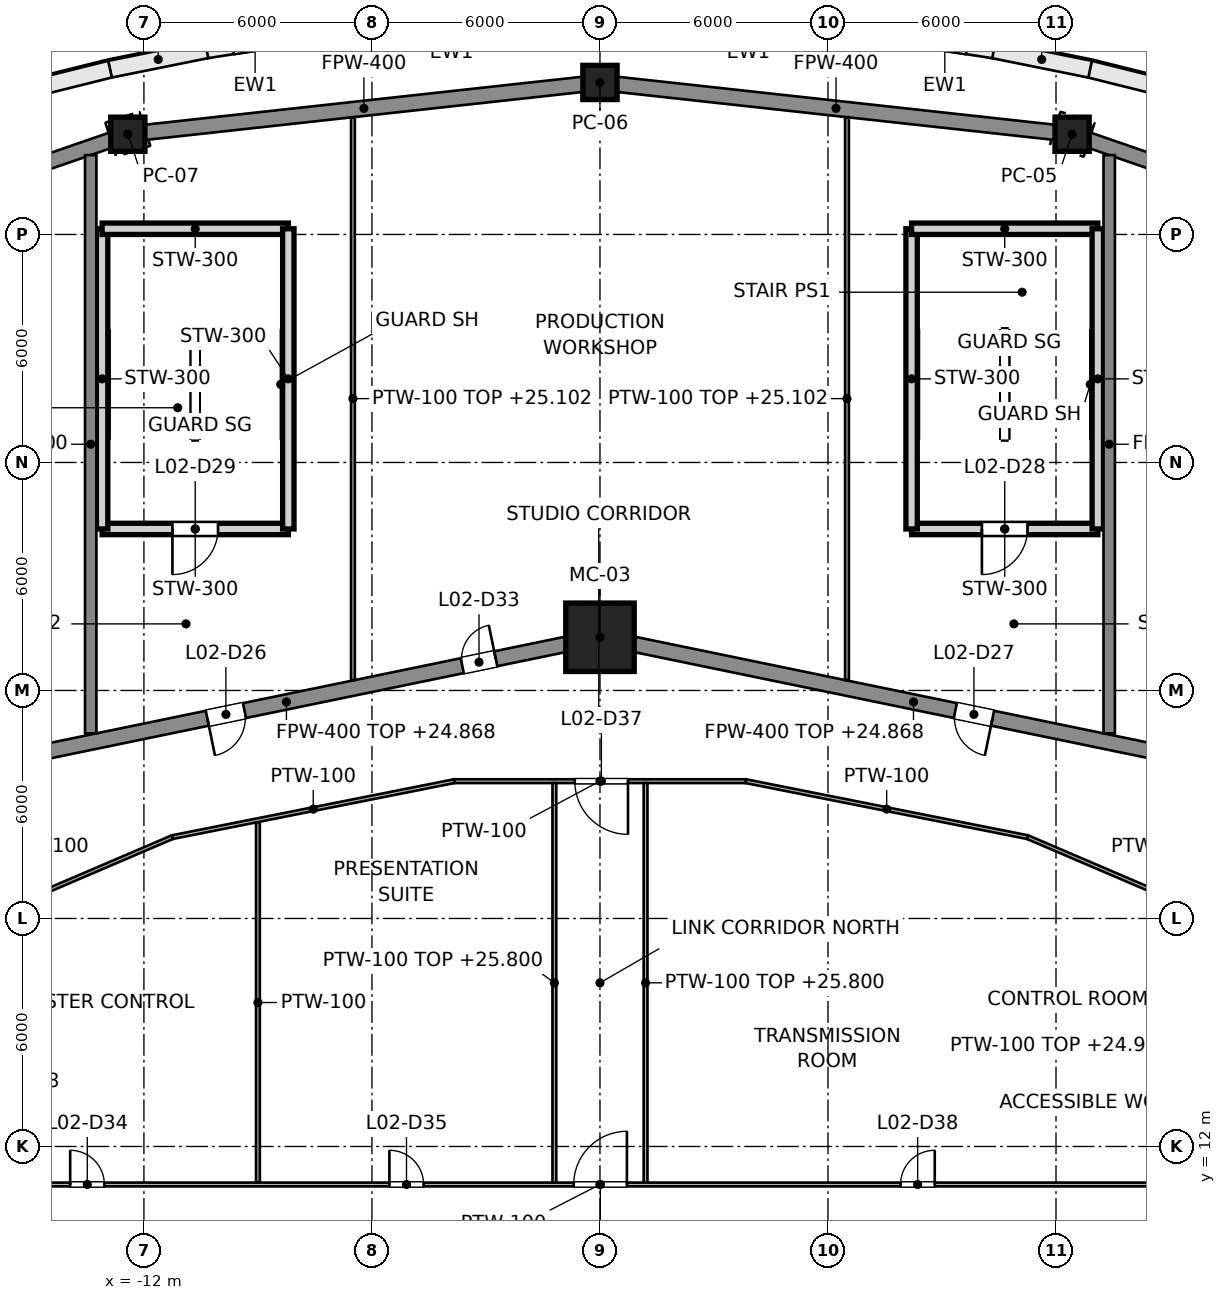
"""IFC4 building model, lengths in metres.
Left out: names, types, materials, properties, quantities, classifications, styles, units other than length and angle.
Written with IfcOpenShell. Run it as: python <this file> out.ifc"""

import sys

from ifc_helpers import new_model, si_unit, direction, frame, frame_2d, origin, origin_2d, place, context, subcontext, project, spatial, polyline, rectangle, hollow_rectangle, outline, extrude, element, fill, save


model = new_model("IFC4")
c1 = context("Model", 3, precision=1e-05, world=origin(), true_north=direction((0.0, 1.0)))
c2 = subcontext(c1, "Body", "Model", "MODEL_VIEW")
j1 = project(units=[si_unit("LENGTHUNIT", "METRE"), si_unit("PLANEANGLEUNIT", "RADIAN")], contexts=[c1])
p1 = place(None, origin())
s1 = spatial("IfcSite", under=j1, at=p1, CompositionType="ELEMENT")
p2 = place(p1, origin())
s2 = spatial("IfcBuilding", under=s1, at=p2, CompositionType="ELEMENT")
p3 = place(p2, frame((0.0, 0.0, 17.0)))
s3 = spatial("IfcBuildingStorey", under=s2, at=p3, CompositionType="ELEMENT", Elevation=17.0)
p4 = place(p3, frame((0.0, 25.4, 0.0), z_axis=(0.0, 0.0, 1.0), x_axis=(0.0, 1.0, 0.0)))
e1 = element("IfcColumn", 1, at=p4, inside=s3, PredefinedType="COLUMN", context=c2, shape_type="SweptSolid", body=[
    extrude(hollow_rectangle(XDim=1.8, YDim=1.8, WallThickness=0.08, at=origin_2d()), origin(), (0.0, 0.0, 1.0), 9.0),
])
for number, where, z_axis, x_axis in (
    (2, (12.423, 38.637, 0.0), (0.0, 0.0, 1.0), (0.306, 0.952, 0.0)),
    (3, (0.0, 40.0, 0.0), (0.0, 0.0, 1.0), (0.0, 1.0, 0.0)),
    (4, (-12.423, 38.637, 0.0), (0.0, 0.0, 1.0), (-0.306, 0.952, 0.0)),
):
    element("IfcColumn", number, at=place(p3, frame(where, z_axis=z_axis, x_axis=x_axis)), inside=s3, PredefinedType="COLUMN", context=c2, shape_type="SweptSolid", body=[
        extrude(hollow_rectangle(XDim=0.9, YDim=0.9, WallThickness=0.04, at=origin_2d()), origin(), (0.0, 0.0, 1.0), 9.0),
    ])
p5 = place(p3, origin())
e5 = element("IfcWall", 5, at=p5, inside=s3, PredefinedType="SOLIDWALL", context=c2, shape_type="SweptSolid", body=[
    extrude(outline(polyline([(25.0, 36.373), (22.699, 37.422), (20.337, 38.369), (17.918, 39.21), (15.451, 39.944), (12.941, 40.569), (12.842, 40.13), (15.332, 39.51), (17.78, 38.782), (20.179, 37.948), (22.522, 37.009), (24.804, 35.968), (25.0, 36.373)])), origin(), (0.0, 0.0, 1.0), 8.8),
])
p6 = place(p3, frame((12.896, 40.348, 0.0), z_axis=(0.0, 0.0, 1.0), x_axis=(-0.980275735323, 0.197634720473, 0.0)))
e6 = element("IfcWall", 6, at=p6, inside=s3, PredefinedType="SOLIDWALL", context=c2, shape_type="SweptSolid", body=[
    extrude(rectangle(XDim=2.597, YDim=0.45, at=frame_2d((1.298, 0.0))), origin(), (0.0, 0.0, 1.0), 8.8),
])
p7 = place(p3, frame((10.361, 40.86, 0.0), z_axis=(0.0, 0.0, 1.0), x_axis=(-0.98810254681, 0.153796479115, 0.0)))
e7 = element("IfcWall", 7, at=p7, inside=s3, PredefinedType="SOLIDWALL", context=c2, shape_type="SweptSolid", body=[
    extrude(rectangle(XDim=2.605, YDim=0.45, at=frame_2d((1.302, 0.0))), origin(), (0.0, 0.0, 1.0), 8.8),
])
p8 = place(p7, frame((0.702, 0.0, 1.0)))
e8 = element("IfcOpeningElement", 8, at=p8, cuts=e7, PredefinedType="OPENING", context=c2, shape_type="SweptSolid", body=[
    extrude(rectangle(XDim=1.2, YDim=1.8, at=frame_2d((0.6, 0.9))), frame((0.0, 0.225, 0.0), z_axis=(0.0, -1.0, 0.0), x_axis=(1.0, 0.0, 0.0)), (0.0, 0.0, 1.0), 0.45),
])
p9 = place(p3, frame((-7.787, 41.26, 0.0), z_axis=(0.0, 0.0, 1.0), x_axis=(-0.98810254681, -0.153796479115, 0.0)))
e9 = element("IfcWall", 9, at=p9, inside=s3, PredefinedType="SOLIDWALL", context=c2, shape_type="SweptSolid", body=[
    extrude(rectangle(XDim=2.605, YDim=0.45, at=frame_2d((1.302, 0.0))), origin(), (0.0, 0.0, 1.0), 8.8),
])
p10 = place(p9, frame((0.702, 0.0, 1.0)))
e10 = element("IfcOpeningElement", 10, at=p10, cuts=e9, PredefinedType="OPENING", context=c2, shape_type="SweptSolid", body=[
    extrude(rectangle(XDim=1.2, YDim=1.8, at=frame_2d((0.6, 0.9))), frame((0.0, 0.225, 0.0), z_axis=(0.0, -1.0, 0.0), x_axis=(1.0, 0.0, 0.0)), (0.0, 0.0, 1.0), 0.45),
])
p11 = place(p3, frame((-10.351, 40.862, 0.0), z_axis=(0.0, 0.0, 1.0), x_axis=(-0.980275735323, -0.197634720473, 0.0)))
e11 = element("IfcWall", 11, at=p11, inside=s3, PredefinedType="SOLIDWALL", context=c2, shape_type="SweptSolid", body=[
    extrude(rectangle(XDim=2.597, YDim=0.45, at=frame_2d((1.298, 0.0))), origin(), (0.0, 0.0, 1.0), 8.8),
])
e12 = element("IfcWall", 12, at=p5, inside=s3, PredefinedType="SOLIDWALL", context=c2, shape_type="SweptSolid", body=[
    extrude(outline(polyline([(-12.941, 40.569), (-15.451, 39.944), (-17.918, 39.21), (-20.337, 38.369), (-22.699, 37.422), (-25.0, 36.373), (-24.804, 35.968), (-22.522, 37.009), (-20.179, 37.948), (-17.78, 38.782), (-15.332, 39.51), (-12.842, 40.13), (-12.941, 40.569)])), origin(), (0.0, 0.0, 1.0), 8.8),
])
p12 = place(p3, frame((13.1, 28.25, 0.0), z_axis=(0.0, 0.0, 1.0), x_axis=(-1.0, 0.0, 0.0)))
e13 = element("IfcWall", 13, at=p12, inside=s3, PredefinedType="SOLIDWALL", context=c2, shape_type="SweptSolid", body=[
    extrude(rectangle(XDim=4.9, YDim=0.3, at=frame_2d((2.45, 0.0))), origin(), (0.0, 0.0, 1.0), 8.8),
])
p13 = place(p12, frame((1.85, 0.0, 0.0)))
e14 = element("IfcOpeningElement", 14, at=p13, cuts=e13, PredefinedType="OPENING", context=c2, shape_type="SweptSolid", body=[
    extrude(rectangle(XDim=1.2, YDim=2.1, at=frame_2d((0.6, 1.05))), frame((0.0, 0.15, 0.0), z_axis=(0.0, -1.0, 0.0), x_axis=(1.0, 0.0, 0.0)), (0.0, 0.0, 1.0), 0.3),
])
p14 = place(p3, frame((8.2, 28.25, 0.0), z_axis=(0.0, 0.0, 1.0), x_axis=(0.0, 1.0, 0.0)))
e15 = element("IfcWall", 15, at=p14, inside=s3, PredefinedType="SOLIDWALL", context=c2, shape_type="SweptSolid", body=[
    extrude(rectangle(XDim=7.9, YDim=0.3, at=frame_2d((3.95, 0.0))), origin(), (0.0, 0.0, 1.0), 8.8),
])
p15 = place(p3, frame((8.2, 36.15, 0.0), z_axis=(0.0, 0.0, 1.0), x_axis=(1.0, 0.0, 0.0)))
e16 = element("IfcWall", 16, at=p15, inside=s3, PredefinedType="SOLIDWALL", context=c2, shape_type="SweptSolid", body=[
    extrude(rectangle(XDim=4.9, YDim=0.3, at=frame_2d((2.45, 0.0))), origin(), (0.0, 0.0, 1.0), 8.8),
])
p16 = place(p3, frame((13.1, 36.15, 0.0), z_axis=(0.0, 0.0, 1.0), x_axis=(0.0, -1.0, 0.0)))
e17 = element("IfcWall", 17, at=p16, inside=s3, PredefinedType="SOLIDWALL", context=c2, shape_type="SweptSolid", body=[
    extrude(rectangle(XDim=7.9, YDim=0.3, at=frame_2d((3.95, 0.0))), origin(), (0.0, 0.0, 1.0), 8.8),
])
p17 = place(p3, frame((-8.2, 28.25, 0.0), z_axis=(0.0, 0.0, 1.0), x_axis=(-1.0, 0.0, 0.0)))
e18 = element("IfcWall", 18, at=p17, inside=s3, PredefinedType="SOLIDWALL", context=c2, shape_type="SweptSolid", body=[
    extrude(rectangle(XDim=4.9, YDim=0.3, at=frame_2d((2.45, 0.0))), origin(), (0.0, 0.0, 1.0), 8.8),
])
p18 = place(p17, frame((1.85, 0.0, 0.0)))
e19 = element("IfcOpeningElement", 19, at=p18, cuts=e18, PredefinedType="OPENING", context=c2, shape_type="SweptSolid", body=[
    extrude(rectangle(XDim=1.2, YDim=2.1, at=frame_2d((0.6, 1.05))), frame((0.0, 0.15, 0.0), z_axis=(0.0, -1.0, 0.0), x_axis=(1.0, 0.0, 0.0)), (0.0, 0.0, 1.0), 0.3),
])
p19 = place(p3, frame((-13.1, 28.25, 0.0), z_axis=(0.0, 0.0, 1.0), x_axis=(0.0, 1.0, 0.0)))
e20 = element("IfcWall", 20, at=p19, inside=s3, PredefinedType="SOLIDWALL", context=c2, shape_type="SweptSolid", body=[
    extrude(rectangle(XDim=7.9, YDim=0.3, at=frame_2d((3.95, 0.0))), origin(), (0.0, 0.0, 1.0), 8.8),
])
p20 = place(p3, frame((-13.1, 36.15, 0.0), z_axis=(0.0, 0.0, 1.0), x_axis=(1.0, 0.0, 0.0)))
e21 = element("IfcWall", 21, at=p20, inside=s3, PredefinedType="SOLIDWALL", context=c2, shape_type="SweptSolid", body=[
    extrude(rectangle(XDim=4.9, YDim=0.3, at=frame_2d((2.45, 0.0))), origin(), (0.0, 0.0, 1.0), 8.8),
])
p21 = place(p3, frame((-8.2, 36.15, 0.0), z_axis=(0.0, 0.0, 1.0), x_axis=(0.0, -1.0, 0.0)))
e22 = element("IfcWall", 22, at=p21, inside=s3, PredefinedType="SOLIDWALL", context=c2, shape_type="SweptSolid", body=[
    extrude(rectangle(XDim=7.9, YDim=0.3, at=frame_2d((3.95, 0.0))), origin(), (0.0, 0.0, 1.0), 8.8),
])
p22 = place(p3, frame((24.0, 34.641, 0.0), z_axis=(0.0, 0.0, 1.0), x_axis=(-0.94527485301, 0.326275117449, 0.0)))
e23 = element("IfcWall", 23, at=p22, inside=s3, PredefinedType="PARTITIONING", context=c2, shape_type="SweptSolid", body=[
    extrude(rectangle(XDim=12.247, YDim=0.4, at=frame_2d((6.124, 0.0))), origin(), (0.0, 0.0, 1.0), 7.877),
])
for number, where, z_axis, x_axis in (
    (24, (12.423, 38.637, 0.0), (0.0, 0.0, 1.0), (-0.994, 0.109, 0.0)),
    (25, (0.0, 40.0, 0.0), (0.0, 0.0, 1.0), (-0.994, -0.109, 0.0)),
):
    element("IfcWall", number, at=place(p3, frame(where, z_axis=z_axis, x_axis=x_axis)), inside=s3, PredefinedType="PARTITIONING", context=c2, shape_type="SweptSolid", body=[
        extrude(rectangle(XDim=12.498, YDim=0.4, at=frame_2d((6.249, 0.0))), origin(), (0.0, 0.0, 1.0), 7.877),
    ])
p23 = place(p3, frame((-12.423, 38.637, 0.0), z_axis=(0.0, 0.0, 1.0), x_axis=(-0.94527485301, -0.326275117449, 0.0)))
e26 = element("IfcWall", 26, at=p23, inside=s3, PredefinedType="PARTITIONING", context=c2, shape_type="SweptSolid", body=[
    extrude(rectangle(XDim=12.247, YDim=0.4, at=frame_2d((6.124, 0.0))), origin(), (0.0, 0.0, 1.0), 7.877),
])
p24 = place(p3, frame((16.5, 21.997, 0.0), z_axis=(0.0, 0.0, 1.0), x_axis=(-0.979389305257, 0.201981654484, 0.0)))
e27 = element("IfcWall", 27, at=p24, inside=s3, PredefinedType="PARTITIONING", context=c2, shape_type="SweptSolid", body=[
    extrude(rectangle(XDim=16.847, YDim=0.4, at=frame_2d((8.424, 0.0))), origin(), (0.0, 0.0, 1.0), 7.868),
])
p25 = place(p24, frame((6.3, 0.0, 0.0)))
e28 = element("IfcOpeningElement", 28, at=p25, cuts=e27, PredefinedType="OPENING", context=c2, shape_type="SweptSolid", body=[
    extrude(rectangle(XDim=1.0, YDim=2.1, at=frame_2d((0.5, 1.05))), frame((0.0, 0.2, 0.0), z_axis=(0.0, -1.0, 0.0), x_axis=(1.0, 0.0, 0.0)), (0.0, 0.0, 1.0), 0.4),
])
p26 = place(p3, frame((0.0, 25.4, 0.0), z_axis=(0.0, 0.0, 1.0), x_axis=(-0.979389305257, -0.201981654484, 0.0)))
e29 = element("IfcWall", 29, at=p26, inside=s3, PredefinedType="PARTITIONING", context=c2, shape_type="SweptSolid", body=[
    extrude(rectangle(XDim=16.847, YDim=0.4, at=frame_2d((8.424, 0.0))), origin(), (0.0, 0.0, 1.0), 7.868),
])
p27 = place(p26, frame((9.55, 0.0, 0.0)))
e30 = element("IfcOpeningElement", 30, at=p27, cuts=e29, PredefinedType="OPENING", context=c2, shape_type="SweptSolid", body=[
    extrude(rectangle(XDim=1.0, YDim=2.1, at=frame_2d((0.5, 1.05))), frame((0.0, 0.2, 0.0), z_axis=(0.0, -1.0, 0.0), x_axis=(1.0, 0.0, 0.0)), (0.0, 0.0, 1.0), 0.4),
])
p28 = place(p26, frame((2.8, 0.0, 0.0)))
e31 = element("IfcOpeningElement", 31, at=p28, cuts=e29, PredefinedType="OPENING", context=c2, shape_type="SweptSolid", body=[
    extrude(rectangle(XDim=0.9, YDim=2.1, at=frame_2d((0.45, 1.05))), frame((0.0, 0.2, 0.0), z_axis=(0.0, -1.0, 0.0), x_axis=(1.0, 0.0, 0.0)), (0.0, 0.0, 1.0), 0.4),
])
p29 = place(p3, frame((17.898, 17.295, 0.0), z_axis=(0.0, 0.0, 1.0), x_axis=(-0.919302147288, 0.3935524895, 0.0)))
e32 = element("IfcWall", 32, at=p29, inside=s3, PredefinedType="PARTITIONING", context=c2, shape_type="SweptSolid", body=[
    extrude(rectangle(XDim=7.23, YDim=0.1, at=frame_2d((3.615, 0.0))), origin(), (0.0, 0.0, 1.0), 7.877),
])
p30 = place(p3, frame((11.251, 20.141, 0.0), z_axis=(0.0, 0.0, 1.0), x_axis=(-0.980829586671, 0.194867447026, 0.0)))
e33 = element("IfcWall", 33, at=p30, inside=s3, PredefinedType="PARTITIONING", context=c2, shape_type="SweptSolid", body=[
    extrude(rectangle(XDim=7.559, YDim=0.1, at=frame_2d((3.779, 0.0))), origin(), (0.0, 0.0, 1.0), 7.877),
])
p31 = place(p3, frame((3.837, 21.614, 0.0), z_axis=(0.0, 0.0, 1.0), x_axis=(-1.0, 0.0, 0.0)))
e34 = element("IfcWall", 34, at=p31, inside=s3, PredefinedType="PARTITIONING", context=c2, shape_type="SweptSolid", body=[
    extrude(rectangle(XDim=7.675, YDim=0.1, at=frame_2d((3.837, 0.0))), origin(), (0.0, 0.0, 1.0), 7.877),
])
p32 = place(p31, frame((3.1, 0.0, 0.0)))
e35 = element("IfcOpeningElement", 35, at=p32, cuts=e34, PredefinedType="OPENING", context=c2, shape_type="SweptSolid", body=[
    extrude(rectangle(XDim=1.4, YDim=2.1, at=frame_2d((0.7, 1.05))), frame((0.0, 0.05, 0.0), z_axis=(0.0, -1.0, 0.0), x_axis=(1.0, 0.0, 0.0)), (0.0, 0.0, 1.0), 0.1),
])
p33 = place(p3, frame((-3.837, 21.614, 0.0), z_axis=(0.0, 0.0, 1.0), x_axis=(-0.980829586671, -0.194867447026, 0.0)))
e36 = element("IfcWall", 36, at=p33, inside=s3, PredefinedType="PARTITIONING", context=c2, shape_type="SweptSolid", body=[
    extrude(rectangle(XDim=7.559, YDim=0.1, at=frame_2d((3.779, 0.0))), origin(), (0.0, 0.0, 1.0), 7.877),
])
p34 = place(p3, frame((-11.251, 20.141, 0.0), z_axis=(0.0, 0.0, 1.0), x_axis=(-0.919302147288, -0.3935524895, 0.0)))
e37 = element("IfcWall", 37, at=p34, inside=s3, PredefinedType="PARTITIONING", context=c2, shape_type="SweptSolid", body=[
    extrude(rectangle(XDim=7.23, YDim=0.1, at=frame_2d((3.615, 0.0))), origin(), (0.0, 0.0, 1.0), 7.877),
])
p35 = place(p3, frame((-24.99, 11.0, 0.0), z_axis=(0.0, 0.0, 1.0), x_axis=(1.0, 0.0, 0.0)))
e38 = element("IfcWall", 38, at=p35, inside=s3, PredefinedType="PARTITIONING", context=c2, shape_type="SweptSolid", body=[
    extrude(rectangle(XDim=49.981, YDim=0.1, at=frame_2d((24.99, 0.0))), origin(), (0.0, 0.0, 1.0), 7.877),
])
p36 = place(p35, frame((11.05, 0.0, 0.0)))
e39 = element("IfcOpeningElement", 39, at=p36, cuts=e38, PredefinedType="OPENING", context=c2, shape_type="SweptSolid", body=[
    extrude(rectangle(XDim=0.9, YDim=2.1, at=frame_2d((0.45, 1.05))), frame((0.0, 0.05, 0.0), z_axis=(0.0, -1.0, 0.0), x_axis=(1.0, 0.0, 0.0)), (0.0, 0.0, 1.0), 0.1),
])
p37 = place(p35, frame((19.45, 0.0, 0.0)))
e40 = element("IfcOpeningElement", 40, at=p37, cuts=e38, PredefinedType="OPENING", context=c2, shape_type="SweptSolid", body=[
    extrude(rectangle(XDim=0.9, YDim=2.1, at=frame_2d((0.45, 1.05))), frame((0.0, 0.05, 0.0), z_axis=(0.0, -1.0, 0.0), x_axis=(1.0, 0.0, 0.0)), (0.0, 0.0, 1.0), 0.1),
])
p38 = place(p35, frame((24.3, 0.0, 0.0)))
e41 = element("IfcOpeningElement", 41, at=p38, cuts=e38, PredefinedType="OPENING", context=c2, shape_type="SweptSolid", body=[
    extrude(rectangle(XDim=1.4, YDim=2.1, at=frame_2d((0.7, 1.05))), frame((0.0, 0.05, 0.0), z_axis=(0.0, -1.0, 0.0), x_axis=(1.0, 0.0, 0.0)), (0.0, 0.0, 1.0), 0.1),
])
p39 = place(p35, frame((32.9, 0.0, 0.0)))
e42 = element("IfcOpeningElement", 42, at=p39, cuts=e38, PredefinedType="OPENING", context=c2, shape_type="SweptSolid", body=[
    extrude(rectangle(XDim=0.9, YDim=2.1, at=frame_2d((0.45, 1.05))), frame((0.0, 0.05, 0.0), z_axis=(0.0, -1.0, 0.0), x_axis=(1.0, 0.0, 0.0)), (0.0, 0.0, 1.0), 0.1),
])
p40 = place(p35, frame((41.3, 0.0, 0.0)))
e43 = element("IfcOpeningElement", 43, at=p40, cuts=e38, PredefinedType="OPENING", context=c2, shape_type="SweptSolid", body=[
    extrude(rectangle(XDim=0.9, YDim=2.1, at=frame_2d((0.45, 1.05))), frame((0.0, 0.05, 0.0), z_axis=(0.0, -1.0, 0.0), x_axis=(1.0, 0.0, 0.0)), (0.0, 0.0, 1.0), 0.1),
])
p41 = place(p3, frame((-9.0, 11.05, 0.0), z_axis=(0.0, 0.0, 1.0), x_axis=(0.0, 1.0, 0.0)))
e44 = element("IfcWall", 44, at=p41, inside=s3, PredefinedType="PARTITIONING", context=c2, shape_type="SweptSolid", body=[
    extrude(rectangle(XDim=9.477, YDim=0.1, at=frame_2d((4.738, 0.0))), origin(), (0.0, 0.0, 1.0), 7.877),
])
for number, where, z_axis, x_axis in (
    (45, (-1.2, 11.05, 0.0), (0.0, 0.0, 1.0), (0.0, 1.0, 0.0)),
    (46, (1.2, 11.05, 0.0), (0.0, 0.0, 1.0), (0.0, 1.0, 0.0)),
):
    element("IfcWall", number, at=place(p3, frame(where, z_axis=z_axis, x_axis=x_axis)), inside=s3, PredefinedType="PARTITIONING", context=c2, shape_type="SweptSolid", body=[
        extrude(rectangle(XDim=10.513, YDim=0.1, at=frame_2d((5.257, 0.0))), origin(), (0.0, 0.0, 1.0), 8.8),
    ])
for number, where, z_axis, x_axis in (
    (47, (13.4, 22.872, 0.0), (0.0, 0.0, 1.0), (0.0, 1.0, 0.0)),
    (48, (-13.4, 22.872, 0.0), (0.0, 0.0, 1.0), (0.0, 1.0, 0.0)),
):
    element("IfcWall", number, at=place(p3, frame(where, z_axis=z_axis, x_axis=x_axis)), inside=s3, PredefinedType="PARTITIONING", context=c2, shape_type="SweptSolid", body=[
        extrude(rectangle(XDim=15.217, YDim=0.3, at=frame_2d((7.608, 0.0))), origin(), (0.0, 0.0, 1.0), 8.026),
    ])
for number, where, z_axis, x_axis in (
    (49, (6.5, 24.274, 0.0), (0.0, 0.0, 1.0), (0.0, 1.0, 0.0)),
    (50, (-6.5, 24.274, 0.0), (0.0, 0.0, 1.0), (0.0, 1.0, 0.0)),
):
    element("IfcWall", number, at=place(p3, frame(where, z_axis=z_axis, x_axis=x_axis)), inside=s3, PredefinedType="PARTITIONING", context=c2, shape_type="SweptSolid", body=[
        extrude(rectangle(XDim=14.812, YDim=0.1, at=frame_2d((7.406, 0.0))), origin(), (0.0, 0.0, 1.0), 8.102),
    ])
p42 = place(p27, origin())
e51 = element("IfcDoor", 51, at=p42, inside=s3, OperationType="SINGLE_SWING_RIGHT", PredefinedType="DOOR", context=c2, shape_type="SweptSolid", body=[
    extrude(rectangle(XDim=1.0, YDim=2.1, at=frame_2d((0.5, 1.05))), frame((0.0, 0.025, 0.0), z_axis=(0.0, -1.0, 0.0), x_axis=(1.0, 0.0, 0.0)), (0.0, 0.0, 1.0), 0.05),
])
fill(e30, e51)
p43 = place(p25, origin())
e52 = element("IfcDoor", 52, at=p43, inside=s3, OperationType="SINGLE_SWING_LEFT", PredefinedType="DOOR", context=c2, shape_type="SweptSolid", body=[
    extrude(rectangle(XDim=1.0, YDim=2.1, at=frame_2d((0.5, 1.05))), frame((0.0, 0.025, 0.0), z_axis=(0.0, -1.0, 0.0), x_axis=(1.0, 0.0, 0.0)), (0.0, 0.0, 1.0), 0.05),
])
fill(e28, e52)
p44 = place(p13, origin())
e53 = element("IfcDoor", 53, at=p44, inside=s3, OperationType="SINGLE_SWING_RIGHT", PredefinedType="DOOR", context=c2, shape_type="SweptSolid", body=[
    extrude(rectangle(XDim=1.2, YDim=2.1, at=frame_2d((0.6, 1.05))), frame((0.0, 0.025, 0.0), z_axis=(0.0, -1.0, 0.0), x_axis=(1.0, 0.0, 0.0)), (0.0, 0.0, 1.0), 0.05),
])
fill(e14, e53)
p45 = place(p18, origin())
e54 = element("IfcDoor", 54, at=p45, inside=s3, OperationType="SINGLE_SWING_RIGHT", PredefinedType="DOOR", context=c2, shape_type="SweptSolid", body=[
    extrude(rectangle(XDim=1.2, YDim=2.1, at=frame_2d((0.6, 1.05))), frame((0.0, 0.025, 0.0), z_axis=(0.0, -1.0, 0.0), x_axis=(1.0, 0.0, 0.0)), (0.0, 0.0, 1.0), 0.05),
])
fill(e19, e54)
p46 = place(p28, origin())
e55 = element("IfcDoor", 55, at=p46, inside=s3, OperationType="SINGLE_SWING_LEFT", PredefinedType="DOOR", context=c2, shape_type="SweptSolid", body=[
    extrude(rectangle(XDim=0.9, YDim=2.1, at=frame_2d((0.45, 1.05))), frame((0.0, 0.025, 0.0), z_axis=(0.0, -1.0, 0.0), x_axis=(1.0, 0.0, 0.0)), (0.0, 0.0, 1.0), 0.05),
])
fill(e31, e55)
p47 = place(p36, origin())
e56 = element("IfcDoor", 56, at=p47, inside=s3, OperationType="SINGLE_SWING_LEFT", PredefinedType="DOOR", context=c2, shape_type="SweptSolid", body=[
    extrude(rectangle(XDim=0.9, YDim=2.1, at=frame_2d((0.45, 1.05))), frame((0.0, 0.025, 0.0), z_axis=(0.0, -1.0, 0.0), x_axis=(1.0, 0.0, 0.0)), (0.0, 0.0, 1.0), 0.05),
])
fill(e39, e56)
p48 = place(p37, origin())
e57 = element("IfcDoor", 57, at=p48, inside=s3, OperationType="SINGLE_SWING_LEFT", PredefinedType="DOOR", context=c2, shape_type="SweptSolid", body=[
    extrude(rectangle(XDim=0.9, YDim=2.1, at=frame_2d((0.45, 1.05))), frame((0.0, 0.025, 0.0), z_axis=(0.0, -1.0, 0.0), x_axis=(1.0, 0.0, 0.0)), (0.0, 0.0, 1.0), 0.05),
])
fill(e40, e57)
p49 = place(p38, origin())
e58 = element("IfcDoor", 58, at=p49, inside=s3, OperationType="SINGLE_SWING_RIGHT", PredefinedType="DOOR", context=c2, shape_type="SweptSolid", body=[
    extrude(rectangle(XDim=1.4, YDim=2.1, at=frame_2d((0.7, 1.05))), frame((0.0, 0.025, 0.0), z_axis=(0.0, -1.0, 0.0), x_axis=(1.0, 0.0, 0.0)), (0.0, 0.0, 1.0), 0.05),
])
fill(e41, e58)
p50 = place(p32, origin())
e59 = element("IfcDoor", 59, at=p50, inside=s3, OperationType="SINGLE_SWING_LEFT", PredefinedType="DOOR", context=c2, shape_type="SweptSolid", body=[
    extrude(rectangle(XDim=1.4, YDim=2.1, at=frame_2d((0.7, 1.05))), frame((0.0, 0.025, 0.0), z_axis=(0.0, -1.0, 0.0), x_axis=(1.0, 0.0, 0.0)), (0.0, 0.0, 1.0), 0.05),
])
fill(e35, e59)
p51 = place(p39, origin())
e60 = element("IfcDoor", 60, at=p51, inside=s3, OperationType="SINGLE_SWING_RIGHT", PredefinedType="DOOR", context=c2, shape_type="SweptSolid", body=[
    extrude(rectangle(XDim=0.9, YDim=2.1, at=frame_2d((0.45, 1.05))), frame((0.0, 0.025, 0.0), z_axis=(0.0, -1.0, 0.0), x_axis=(1.0, 0.0, 0.0)), (0.0, 0.0, 1.0), 0.05),
])
fill(e42, e60)
save(model, sys.argv[1])
